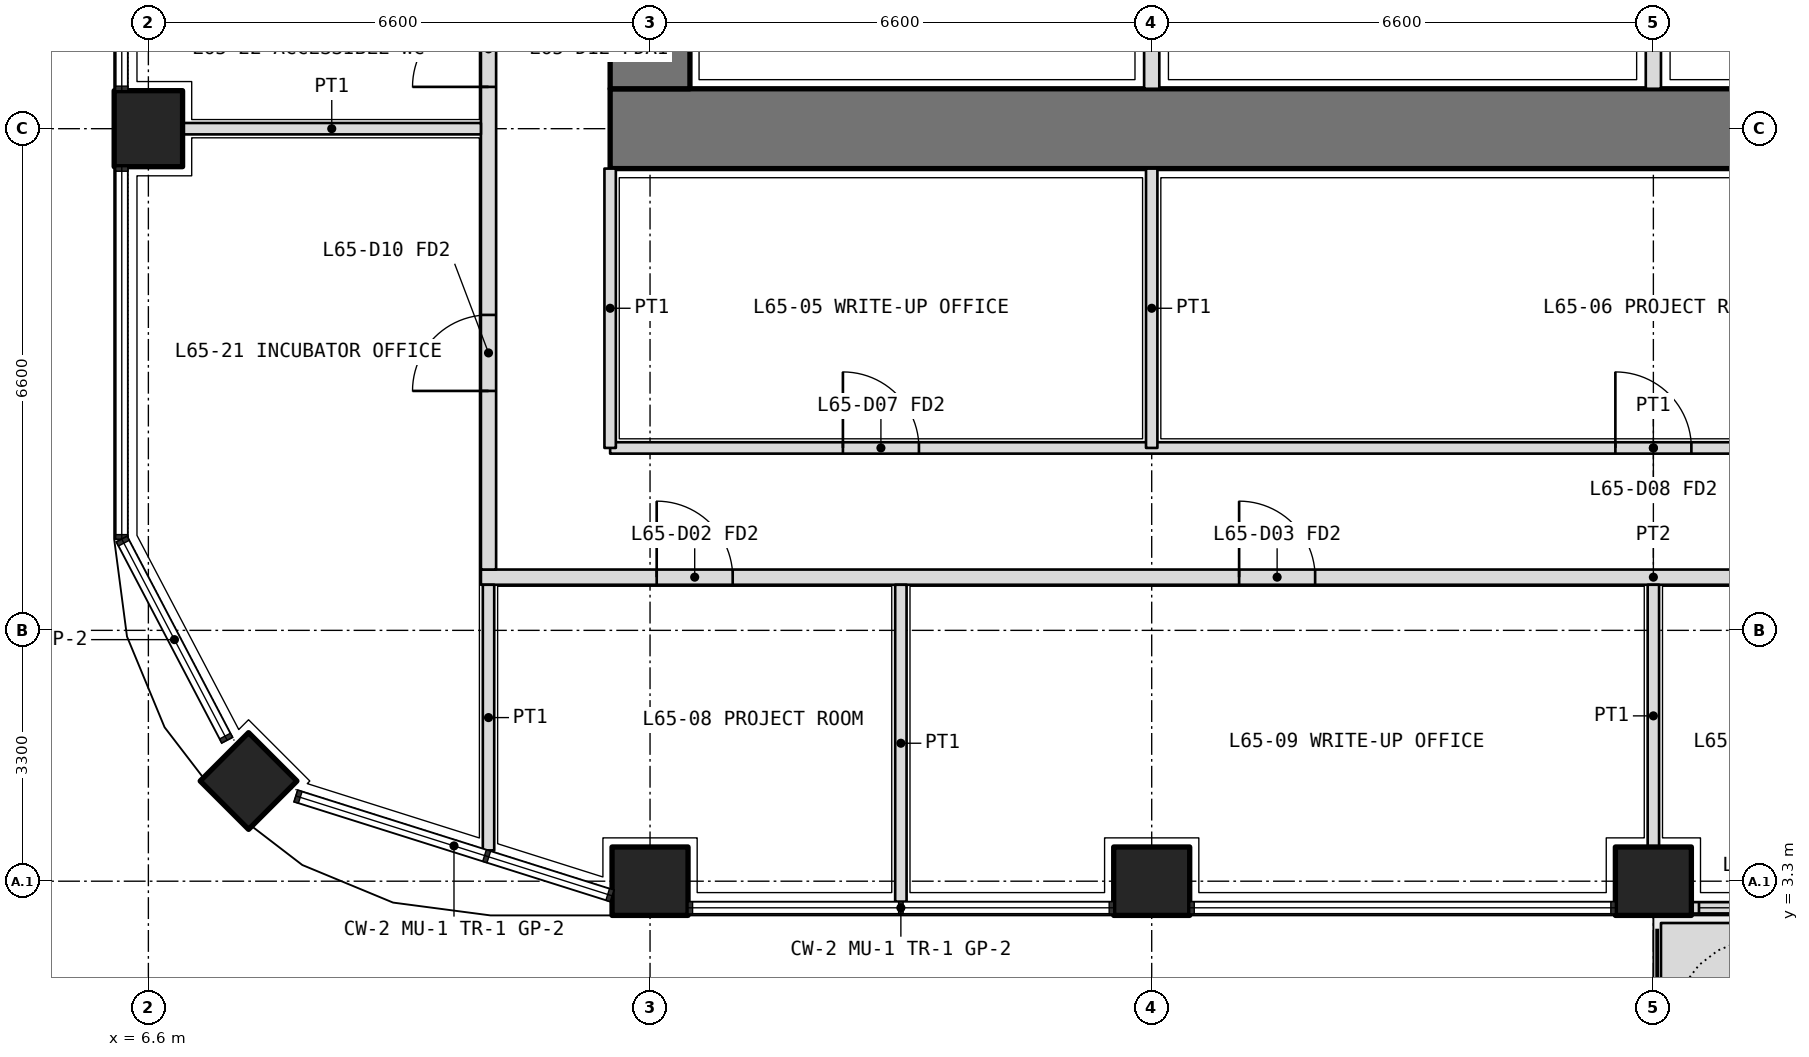
"""IFC4 building model, lengths in metres.
Left out: names, types, materials, properties, quantities, classifications, styles, units other than length and angle.
Written with IfcOpenShell. Run it as: python <this file> out.ifc"""

import sys

from ifc_helpers import new_model, si_unit, direction, frame, frame_2d, origin, origin_2d, place, context, subcontext, project, spatial, polyline, rectangle, outline, extrude, element, fill, save


model = new_model("IFC4")
c1 = context("Model", 3, precision=1e-05, world=origin(), true_north=direction((0.0, 1.0)))
c2 = subcontext(c1, "Body", "Model", "MODEL_VIEW")
j1 = project(units=[si_unit("LENGTHUNIT", "METRE"), si_unit("PLANEANGLEUNIT", "RADIAN")], contexts=[c1])
p1 = place(None, origin())
s1 = spatial("IfcSite", under=j1, at=p1, CompositionType="ELEMENT")
p2 = place(p1, origin())
s2 = spatial("IfcBuilding", under=s1, at=p2, CompositionType="ELEMENT")
p3 = place(p2, frame((0.0, 0.0, 283.8)))
s3 = spatial("IfcBuildingStorey", under=s2, at=p3, CompositionType="ELEMENT", Elevation=283.8)
p4 = place(p3, frame((7.918, 4.618, 0.0), z_axis=(0.0, 0.0, 1.0), x_axis=(0.707106781187, 0.707106781187, 0.0)))
e1 = element("IfcColumn", 1, at=p4, inside=s3, PredefinedType="COLUMN", context=c2, shape_type="SweptSolid", body=[
    extrude(rectangle(XDim=0.9, YDim=0.9, at=origin_2d()), origin(), (0.0, 0.0, 1.0), 4.2),
])
for number, where, z_axis, x_axis in (
    (2, (13.2, 3.3, 0.0), (0.0, 0.0, 1.0), (1.0, 0.0, 0.0)),
    (3, (19.8, 3.3, 0.0), (0.0, 0.0, 1.0), (1.0, 0.0, 0.0)),
    (4, (26.4, 3.3, 0.0), (0.0, 0.0, 1.0), (1.0, 0.0, 0.0)),
    (5, (6.6, 13.2, 0.0), (0.0, 0.0, 1.0), (0.0, 1.0, 0.0)),
):
    element("IfcColumn", number, at=place(p3, frame(where, z_axis=z_axis, x_axis=x_axis)), inside=s3, PredefinedType="COLUMN", context=c2, shape_type="SweptSolid", body=[
        extrude(rectangle(XDim=1.0, YDim=0.9, at=origin_2d()), origin(), (0.0, 0.0, 1.0), 4.2),
    ])
p5 = place(p3, origin())
e6 = element("IfcWall", 6, at=p5, inside=s3, PredefinedType="USERDEFINED", context=c2, shape_type="SweptSolid", body=[
    extrude(outline(polyline([(26.5, 1.75), (28.95, 1.75), (28.95, 2.75), (26.5, 2.75), (26.5, 1.75)]), holes=[polyline([(26.65, 1.9), (28.8, 1.9), (28.8, 2.6), (26.65, 2.6), (26.65, 1.9)])]), origin(), (0.0, 0.0, 1.0), 1.05),
])
p6 = place(p3, frame((26.9, 2.95, 0.0), z_axis=(0.0, 0.0, 1.0), x_axis=(1.0, 0.0, 0.0)))
e7 = element("IfcWall", 7, at=p6, inside=s3, PredefinedType="SOLIDWALL", context=c2, shape_type="SweptSolid", body=[
    extrude(rectangle(XDim=5.6, YDim=0.15, at=frame_2d((2.8, 0.0))), origin(), (0.0, 0.0, 1.0), 2.7),
])
p7 = place(p6, frame((3.05, 0.0, 0.0)))
e8 = element("IfcOpeningElement", 8, at=p7, cuts=e7, PredefinedType="OPENING", context=c2, shape_type="SweptSolid", body=[
    extrude(rectangle(XDim=1.0, YDim=2.4, at=frame_2d((0.5, 1.2))), frame((0.0, 0.085, 0.0), z_axis=(0.0, -1.0, 0.0), x_axis=(1.0, 0.0, 0.0)), (0.0, 0.0, 1.0), 0.17),
])
p8 = place(p6, frame((0.1, 0.0, 0.1)))
e9 = element("IfcOpeningElement", 9, at=p8, cuts=e7, PredefinedType="OPENING", context=c2, shape_type="SweptSolid", body=[
    extrude(rectangle(XDim=2.45, YDim=2.3, at=frame_2d((1.225, 1.15))), frame((0.0, 0.085, 0.0), z_axis=(0.0, -1.0, 0.0), x_axis=(1.0, 0.0, 0.0)), (0.0, 0.0, 1.0), 0.17),
])
p9 = place(p6, frame((4.15, 0.0, 0.1)))
e10 = element("IfcOpeningElement", 10, at=p9, cuts=e7, PredefinedType="OPENING", context=c2, shape_type="SweptSolid", body=[
    extrude(rectangle(XDim=1.35, YDim=2.3, at=frame_2d((0.675, 1.15))), frame((0.0, 0.085, 0.0), z_axis=(0.0, -1.0, 0.0), x_axis=(1.0, 0.0, 0.0)), (0.0, 0.0, 1.0), 0.17),
])
p10 = place(p3, frame((12.675, 13.2, 0.0), z_axis=(0.0, 0.0, 1.0), x_axis=(1.0, 0.0, 0.0)))
e11 = element("IfcWall", 11, at=p10, inside=s3, PredefinedType="SHEAR", context=c2, shape_type="SweptSolid", body=[
    extrude(rectangle(XDim=27.45, YDim=1.05, at=frame_2d((13.725, 0.0))), origin(), (0.0, 0.0, 1.0), 4.2),
])
p11 = place(p3, frame((13.2, 32.475, 0.0), z_axis=(0.0, 0.0, 1.0), x_axis=(0.0, -1.0, 0.0)))
e12 = element("IfcWall", 12, at=p11, inside=s3, PredefinedType="SHEAR", context=c2, shape_type="SweptSolid", body=[
    extrude(rectangle(XDim=18.75, YDim=1.05, at=frame_2d((9.375, 0.0))), origin(), (0.0, 0.0, 1.0), 4.2),
])
p12 = place(p11, frame((14.125, 0.0, 0.0)))
e13 = element("IfcOpeningElement", 13, at=p12, cuts=e12, PredefinedType="OPENING", context=c2, shape_type="SweptSolid", body=[
    extrude(rectangle(XDim=1.6, YDim=2.1, at=frame_2d((0.8, 1.05))), frame((0.0, 0.535, 0.0), z_axis=(0.0, -1.0, 0.0), x_axis=(1.0, 0.0, 0.0)), (0.0, 0.0, 1.0), 1.07),
])
p13 = place(p11, frame((3.325, 0.0, 0.0)))
e14 = element("IfcOpeningElement", 14, at=p13, cuts=e12, PredefinedType="OPENING", context=c2, shape_type="SweptSolid", body=[
    extrude(rectangle(XDim=1.6, YDim=2.1, at=frame_2d((0.8, 1.05))), frame((0.0, 0.535, 0.0), z_axis=(0.0, -1.0, 0.0), x_axis=(1.0, 0.0, 0.0)), (0.0, 0.0, 1.0), 1.07),
])
for number, where, z_axis, x_axis in (
    (15, (19.8, 13.725, 0.0), (0.0, 0.0, 1.0), (0.0, 1.0, 0.0)),
    (16, (26.4, 13.725, 0.0), (0.0, 0.0, 1.0), (0.0, 1.0, 0.0)),
):
    element("IfcWall", number, at=place(p3, frame(where, z_axis=z_axis, x_axis=x_axis)), inside=s3, PredefinedType="PARTITIONING", context=c2, shape_type="SweptSolid", body=[
        extrude(rectangle(XDim=1.975, YDim=0.2, at=frame_2d((0.987, 0.0))), origin(), (0.0, 0.0, 1.0), 4.2),
    ])
p14 = place(p3, frame((12.675, 9.0, 0.0), z_axis=(0.0, 0.0, 1.0), x_axis=(1.0, 0.0, 0.0)))
e17 = element("IfcWall", 17, at=p14, inside=s3, PredefinedType="PARTITIONING", context=c2, shape_type="SweptSolid", body=[
    extrude(rectangle(XDim=27.45, YDim=0.15, at=frame_2d((13.725, 0.0))), origin(), (0.0, 0.0, 1.0), 3.0),
])
p15 = place(p14, frame((3.062, 0.0, 0.0)))
e18 = element("IfcOpeningElement", 18, at=p15, cuts=e17, PredefinedType="OPENING", context=c2, shape_type="SweptSolid", body=[
    extrude(rectangle(XDim=1.0, YDim=2.1, at=frame_2d((0.5, 1.05))), frame((0.0, 0.085, 0.0), z_axis=(0.0, -1.0, 0.0), x_axis=(1.0, 0.0, 0.0)), (0.0, 0.0, 1.0), 0.17),
])
p16 = place(p14, frame((13.225, 0.0, 0.0)))
e19 = element("IfcOpeningElement", 19, at=p16, cuts=e17, PredefinedType="OPENING", context=c2, shape_type="SweptSolid", body=[
    extrude(rectangle(XDim=1.0, YDim=2.1, at=frame_2d((0.5, 1.05))), frame((0.0, 0.085, 0.0), z_axis=(0.0, -1.0, 0.0), x_axis=(1.0, 0.0, 0.0)), (0.0, 0.0, 1.0), 0.17),
])
p17 = place(p14, frame((23.387, 0.0, 0.0)))
e20 = element("IfcOpeningElement", 20, at=p17, cuts=e17, PredefinedType="OPENING", context=c2, shape_type="SweptSolid", body=[
    extrude(rectangle(XDim=1.0, YDim=2.1, at=frame_2d((0.5, 1.05))), frame((0.0, 0.085, 0.0), z_axis=(0.0, -1.0, 0.0), x_axis=(1.0, 0.0, 0.0)), (0.0, 0.0, 1.0), 0.17),
])
for number, where, z_axis, x_axis in (
    (21, (12.675, 12.675, 0.0), (0.0, 0.0, 1.0), (0.0, -1.0, 0.0)),
    (22, (19.8, 12.675, 0.0), (0.0, 0.0, 1.0), (0.0, -1.0, 0.0)),
):
    element("IfcWall", number, at=place(p3, frame(where, z_axis=z_axis, x_axis=x_axis)), inside=s3, PredefinedType="PARTITIONING", context=c2, shape_type="SweptSolid", body=[
        extrude(rectangle(XDim=3.675, YDim=0.15, at=frame_2d((1.837, 0.0))), origin(), (0.0, 0.0, 1.0), 3.0),
    ])
p18 = place(p3, frame((10.975, 7.3, 0.0), z_axis=(0.0, 0.0, 1.0), x_axis=(1.0, 0.0, 0.0)))
e23 = element("IfcWall", 23, at=p18, inside=s3, PredefinedType="PARTITIONING", context=c2, shape_type="SweptSolid", body=[
    extrude(rectangle(XDim=30.85, YDim=0.2, at=frame_2d((15.425, 0.0))), origin(), (0.0, 0.0, 1.0), 3.0),
])
p19 = place(p18, frame((2.312, 0.0, 0.0)))
e24 = element("IfcOpeningElement", 24, at=p19, cuts=e23, PredefinedType="OPENING", context=c2, shape_type="SweptSolid", body=[
    extrude(rectangle(XDim=1.0, YDim=2.1, at=frame_2d((0.5, 1.05))), frame((0.0, 0.11, 0.0), z_axis=(0.0, -1.0, 0.0), x_axis=(1.0, 0.0, 0.0)), (0.0, 0.0, 1.0), 0.22),
])
p20 = place(p18, frame((9.975, 0.0, 0.0)))
e25 = element("IfcOpeningElement", 25, at=p20, cuts=e23, PredefinedType="OPENING", context=c2, shape_type="SweptSolid", body=[
    extrude(rectangle(XDim=1.0, YDim=2.1, at=frame_2d((0.5, 1.05))), frame((0.0, 0.11, 0.0), z_axis=(0.0, -1.0, 0.0), x_axis=(1.0, 0.0, 0.0)), (0.0, 0.0, 1.0), 0.22),
])
p21 = place(p18, frame((19.875, 0.0, 0.0)))
e26 = element("IfcOpeningElement", 26, at=p21, cuts=e23, PredefinedType="OPENING", context=c2, shape_type="SweptSolid", body=[
    extrude(rectangle(XDim=1.0, YDim=2.1, at=frame_2d((0.5, 1.05))), frame((0.0, 0.11, 0.0), z_axis=(0.0, -1.0, 0.0), x_axis=(1.0, 0.0, 0.0)), (0.0, 0.0, 1.0), 0.22),
])
p22 = place(p18, frame((26.475, 0.0, 0.0)))
e27 = element("IfcOpeningElement", 27, at=p22, cuts=e23, PredefinedType="OPENING", context=c2, shape_type="SweptSolid", body=[
    extrude(rectangle(XDim=1.0, YDim=2.1, at=frame_2d((0.5, 1.05))), frame((0.0, 0.11, 0.0), z_axis=(0.0, -1.0, 0.0), x_axis=(1.0, 0.0, 0.0)), (0.0, 0.0, 1.0), 0.22),
])
p23 = place(p18, frame((29.188, 0.0, 0.0)))
e28 = element("IfcOpeningElement", 28, at=p23, cuts=e23, PredefinedType="OPENING", context=c2, shape_type="SweptSolid", body=[
    extrude(rectangle(XDim=1.0, YDim=2.1, at=frame_2d((0.5, 1.05))), frame((0.0, 0.11, 0.0), z_axis=(0.0, -1.0, 0.0), x_axis=(1.0, 0.0, 0.0)), (0.0, 0.0, 1.0), 0.22),
])
p24 = place(p3, frame((11.075, 7.4, 0.0), z_axis=(0.0, 0.0, 1.0), x_axis=(0.0, 1.0, 0.0)))
e29 = element("IfcWall", 29, at=p24, inside=s3, PredefinedType="PARTITIONING", context=c2, shape_type="SweptSolid", body=[
    extrude(rectangle(XDim=19.0, YDim=0.2, at=frame_2d((9.5, 0.0))), origin(), (0.0, 0.0, 1.0), 3.0),
])
p25 = place(p24, frame((2.35, 0.0, 0.0)))
e30 = element("IfcOpeningElement", 30, at=p25, cuts=e29, PredefinedType="OPENING", context=c2, shape_type="SweptSolid", body=[
    extrude(rectangle(XDim=1.0, YDim=2.1, at=frame_2d((0.5, 1.05))), frame((0.0, 0.11, 0.0), z_axis=(0.0, -1.0, 0.0), x_axis=(1.0, 0.0, 0.0)), (0.0, 0.0, 1.0), 0.22),
])
p26 = place(p24, frame((6.35, 0.0, 0.0)))
e31 = element("IfcOpeningElement", 31, at=p26, cuts=e29, PredefinedType="OPENING", context=c2, shape_type="SweptSolid", body=[
    extrude(rectangle(XDim=1.0, YDim=2.1, at=frame_2d((0.5, 1.05))), frame((0.0, 0.11, 0.0), z_axis=(0.0, -1.0, 0.0), x_axis=(1.0, 0.0, 0.0)), (0.0, 0.0, 1.0), 0.22),
])
p27 = place(p24, frame((9.45, 0.0, 0.0)))
e32 = element("IfcOpeningElement", 32, at=p27, cuts=e29, PredefinedType="OPENING", context=c2, shape_type="SweptSolid", body=[
    extrude(rectangle(XDim=0.9, YDim=2.1, at=frame_2d((0.45, 1.05))), frame((0.0, 0.11, 0.0), z_axis=(0.0, -1.0, 0.0), x_axis=(1.0, 0.0, 0.0)), (0.0, 0.0, 1.0), 0.22),
])
p28 = place(p24, frame((13.35, 0.0, 0.0)))
e33 = element("IfcOpeningElement", 33, at=p28, cuts=e29, PredefinedType="OPENING", context=c2, shape_type="SweptSolid", body=[
    extrude(rectangle(XDim=0.9, YDim=2.1, at=frame_2d((0.45, 1.05))), frame((0.0, 0.11, 0.0), z_axis=(0.0, -1.0, 0.0), x_axis=(1.0, 0.0, 0.0)), (0.0, 0.0, 1.0), 0.22),
])
p29 = place(p24, frame((16.85, 0.0, 0.0)))
e34 = element("IfcOpeningElement", 34, at=p29, cuts=e29, PredefinedType="OPENING", context=c2, shape_type="SweptSolid", body=[
    extrude(rectangle(XDim=1.0, YDim=2.1, at=frame_2d((0.5, 1.05))), frame((0.0, 0.11, 0.0), z_axis=(0.0, -1.0, 0.0), x_axis=(1.0, 0.0, 0.0)), (0.0, 0.0, 1.0), 0.22),
])
p30 = place(p3, frame((11.075, 3.705, 0.0), z_axis=(0.0, 0.0, 1.0), x_axis=(0.0, 1.0, 0.0)))
e35 = element("IfcWall", 35, at=p30, inside=s3, PredefinedType="PARTITIONING", context=c2, shape_type="SweptSolid", body=[
    extrude(rectangle(XDim=3.495, YDim=0.15, at=frame_2d((1.748, 0.0))), origin(), (0.0, 0.0, 1.0), 2.7),
])
p31 = place(p3, frame((16.5, 3.03, 0.0), z_axis=(0.0, 0.0, 1.0), x_axis=(0.0, 1.0, 0.0)))
e36 = element("IfcWall", 36, at=p31, inside=s3, PredefinedType="PARTITIONING", context=c2, shape_type="SweptSolid", body=[
    extrude(rectangle(XDim=4.17, YDim=0.15, at=frame_2d((2.085, 0.0))), origin(), (0.0, 0.0, 1.0), 2.7),
])
p32 = place(p3, frame((26.4, 3.75, 0.0), z_axis=(0.0, 0.0, 1.0), x_axis=(0.0, 1.0, 0.0)))
e37 = element("IfcWall", 37, at=p32, inside=s3, PredefinedType="PARTITIONING", context=c2, shape_type="SweptSolid", body=[
    extrude(rectangle(XDim=3.45, YDim=0.15, at=frame_2d((1.725, 0.0))), origin(), (0.0, 0.0, 1.0), 3.0),
])
p33 = place(p3, frame((7.05, 13.2, 0.0), z_axis=(0.0, 0.0, 1.0), x_axis=(1.0, 0.0, 0.0)))
e38 = element("IfcWall", 38, at=p33, inside=s3, PredefinedType="PARTITIONING", context=c2, shape_type="SweptSolid", body=[
    extrude(rectangle(XDim=3.925, YDim=0.15, at=frame_2d((1.962, 0.0))), origin(), (0.0, 0.0, 1.0), 3.0),
])
p34 = place(p8, origin())
e39 = element("IfcWindow", 39, at=p34, inside=s3, PartitioningType="SINGLE_PANEL", PredefinedType="WINDOW", context=c2, shape_type="SweptSolid", body=[
    extrude(rectangle(XDim=2.45, YDim=2.3, at=frame_2d((1.225, 1.15))), frame((0.0, 0.03, 0.0), z_axis=(0.0, -1.0, 0.0), x_axis=(1.0, 0.0, 0.0)), (0.0, 0.0, 1.0), 0.06),
])
fill(e9, e39)
p35 = place(p15, origin())
e40 = element("IfcDoor", 40, at=p35, inside=s3, OperationType="SINGLE_SWING_LEFT", PredefinedType="DOOR", context=c2, shape_type="SweptSolid", body=[
    extrude(rectangle(XDim=1.0, YDim=2.1, at=frame_2d((0.5, 1.05))), frame((0.0, 0.025, 0.0), z_axis=(0.0, -1.0, 0.0), x_axis=(1.0, 0.0, 0.0)), (0.0, 0.0, 1.0), 0.05),
])
fill(e18, e40)
p36 = place(p16, origin())
e41 = element("IfcDoor", 41, at=p36, inside=s3, OperationType="SINGLE_SWING_LEFT", PredefinedType="DOOR", context=c2, shape_type="SweptSolid", body=[
    extrude(rectangle(XDim=1.0, YDim=2.1, at=frame_2d((0.5, 1.05))), frame((0.0, 0.025, 0.0), z_axis=(0.0, -1.0, 0.0), x_axis=(1.0, 0.0, 0.0)), (0.0, 0.0, 1.0), 0.05),
])
fill(e19, e41)
p37 = place(p19, origin())
e42 = element("IfcDoor", 42, at=p37, inside=s3, OperationType="SINGLE_SWING_LEFT", PredefinedType="DOOR", context=c2, shape_type="SweptSolid", body=[
    extrude(rectangle(XDim=1.0, YDim=2.1, at=frame_2d((0.5, 1.05))), frame((0.0, 0.025, 0.0), z_axis=(0.0, -1.0, 0.0), x_axis=(1.0, 0.0, 0.0)), (0.0, 0.0, 1.0), 0.05),
])
fill(e24, e42)
p38 = place(p20, origin())
e43 = element("IfcDoor", 43, at=p38, inside=s3, OperationType="SINGLE_SWING_LEFT", PredefinedType="DOOR", context=c2, shape_type="SweptSolid", body=[
    extrude(rectangle(XDim=1.0, YDim=2.1, at=frame_2d((0.5, 1.05))), frame((0.0, 0.025, 0.0), z_axis=(0.0, -1.0, 0.0), x_axis=(1.0, 0.0, 0.0)), (0.0, 0.0, 1.0), 0.05),
])
fill(e25, e43)
p39 = place(p25, origin())
e44 = element("IfcDoor", 44, at=p39, inside=s3, OperationType="SINGLE_SWING_LEFT", PredefinedType="DOOR", context=c2, shape_type="SweptSolid", body=[
    extrude(rectangle(XDim=1.0, YDim=2.1, at=frame_2d((0.5, 1.05))), frame((0.0, 0.025, 0.0), z_axis=(0.0, -1.0, 0.0), x_axis=(1.0, 0.0, 0.0)), (0.0, 0.0, 1.0), 0.05),
])
fill(e30, e44)
p40 = place(p26, origin())
e45 = element("IfcDoor", 45, at=p40, inside=s3, OperationType="SINGLE_SWING_LEFT", PredefinedType="DOOR", context=c2, shape_type="SweptSolid", body=[
    extrude(rectangle(XDim=1.0, YDim=2.1, at=frame_2d((0.5, 1.05))), frame((0.0, 0.025, 0.0), z_axis=(0.0, -1.0, 0.0), x_axis=(1.0, 0.0, 0.0)), (0.0, 0.0, 1.0), 0.05),
])
fill(e31, e45)
save(model, sys.argv[1])
